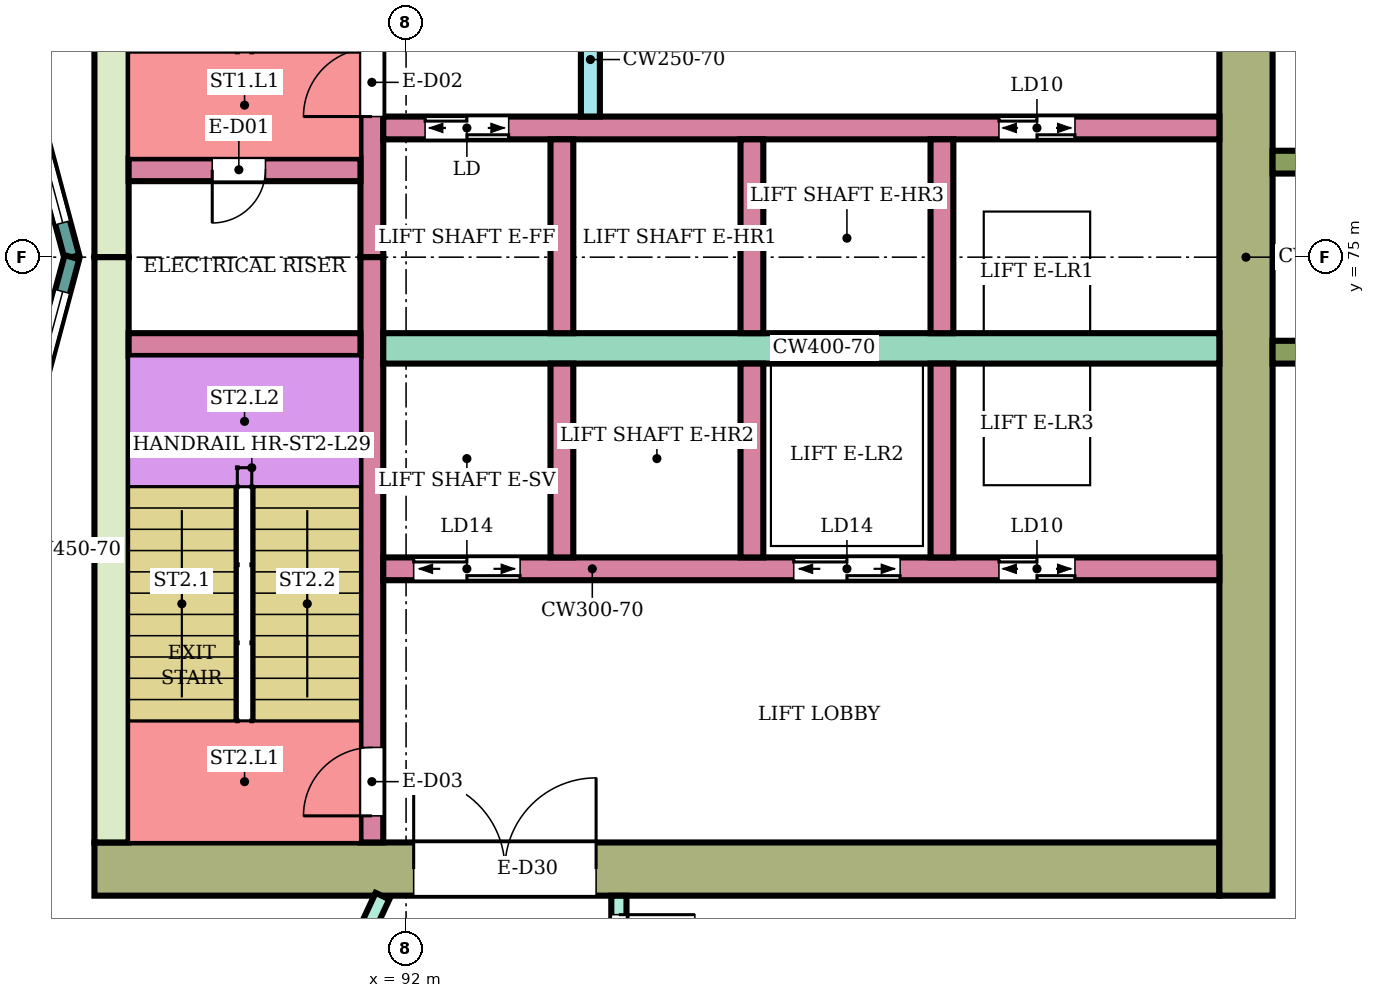
"""IFC4 building model, lengths in metres.
Left out: names, types, materials, properties, quantities, classifications, styles, units other than length and angle.
Written with IfcOpenShell. Run it as: python <this file> out.ifc"""

import sys

from ifc_helpers import new_model, si_unit, direction, frame, frame_2d, origin, place, context, subcontext, project, spatial, rectangle, extrude, element, fill, save


model = new_model("IFC4")
c1 = context("Model", 3, precision=1e-05, world=origin(), true_north=direction((0.0, 1.0)))
c2 = subcontext(c1, "Body", "Model", "MODEL_VIEW")
j1 = project(units=[si_unit("LENGTHUNIT", "METRE"), si_unit("PLANEANGLEUNIT", "RADIAN")], contexts=[c1])
p1 = place(None, origin())
s1 = spatial("IfcSite", under=j1, at=p1, CompositionType="ELEMENT")
p2 = place(p1, origin())
s2 = spatial("IfcBuilding", under=s1, at=p2, CompositionType="ELEMENT")
p3 = place(p2, frame((0.0, 0.0, 126.3)))
s3 = spatial("IfcBuildingStorey", under=s2, at=p3, CompositionType="ELEMENT", Elevation=126.3)
p4 = place(p3, frame((87.9, 66.95, 0.0), z_axis=(0.0, 0.0, 1.0), x_axis=(1.0, 0.0, 0.0)))
e1 = element("IfcWall", 1, at=p4, inside=s3, PredefinedType="SHEAR", context=c2, shape_type="SweptSolid", body=[
    extrude(rectangle(XDim=14.8, YDim=0.7, at=frame_2d((7.4, 0.0))), origin(), (0.0, 0.0, 1.0), 3.58),
])
p5 = place(p4, frame((4.2, 0.0, 0.0)))
e2 = element("IfcOpeningElement", 2, at=p5, cuts=e1, PredefinedType="OPENING", context=c2, shape_type="SweptSolid", body=[
    extrude(rectangle(XDim=2.4, YDim=2.4, at=frame_2d((1.2, 1.2))), frame((0.0, 0.36, 0.0), z_axis=(0.0, -1.0, 0.0), x_axis=(1.0, 0.0, 0.0)), (0.0, 0.0, 1.0), 0.72),
])
for number, where, z_axis, x_axis in (
    (3, (88.125, 75.0, 0.0), (0.0, 0.0, 1.0), (0.0, 1.0, 0.0)),
    (4, (88.125, 67.3, 0.0), (0.0, 0.0, 1.0), (0.0, 1.0, 0.0)),
):
    element("IfcWall", number, at=place(p3, frame(where, z_axis=z_axis, x_axis=x_axis)), inside=s3, PredefinedType="SHEAR", context=c2, shape_type="SweptSolid", body=[
        extrude(rectangle(XDim=7.7, YDim=0.45, at=frame_2d((3.85, 0.0))), origin(), (0.0, 0.0, 1.0), 3.58),
    ])
p6 = place(p3, frame((103.05, 66.6, 0.0), z_axis=(0.0, 0.0, 1.0), x_axis=(0.0, 1.0, 0.0)))
e5 = element("IfcWall", 5, at=p6, inside=s3, PredefinedType="SHEAR", context=c2, shape_type="SweptSolid", body=[
    extrude(rectangle(XDim=16.8, YDim=0.7, at=frame_2d((8.4, 0.0))), origin(), (0.0, 0.0, 1.0), 3.58),
])
p7 = place(p3, frame((91.55, 75.0, 0.0), z_axis=(0.0, 0.0, 1.0), x_axis=(0.0, 1.0, 0.0)))
e6 = element("IfcWall", 6, at=p7, inside=s3, PredefinedType="SHEAR", context=c2, shape_type="SweptSolid", body=[
    extrude(rectangle(XDim=7.7, YDim=0.3, at=frame_2d((3.85, 0.0))), origin(), (0.0, 0.0, 1.0), 3.58),
])
p8 = place(p7, frame((1.85, 0.0, 0.0)))
e7 = element("IfcOpeningElement", 7, at=p8, cuts=e6, PredefinedType="OPENING", context=c2, shape_type="SweptSolid", body=[
    extrude(rectangle(XDim=0.9, YDim=2.1, at=frame_2d((0.45, 1.05))), frame((0.0, 0.16, 0.0), z_axis=(0.0, -1.0, 0.0), x_axis=(1.0, 0.0, 0.0)), (0.0, 0.0, 1.0), 0.32),
])
p9 = place(p3, frame((91.55, 67.3, 0.0), z_axis=(0.0, 0.0, 1.0), x_axis=(0.0, 1.0, 0.0)))
e8 = element("IfcWall", 8, at=p9, inside=s3, PredefinedType="SHEAR", context=c2, shape_type="SweptSolid", body=[
    extrude(rectangle(XDim=7.7, YDim=0.3, at=frame_2d((3.85, 0.0))), origin(), (0.0, 0.0, 1.0), 3.58),
])
p10 = place(p9, frame((0.35, 0.0, 0.0)))
e9 = element("IfcOpeningElement", 9, at=p10, cuts=e8, PredefinedType="OPENING", context=c2, shape_type="SweptSolid", body=[
    extrude(rectangle(XDim=0.9, YDim=2.1, at=frame_2d((0.45, 1.05))), frame((0.0, 0.16, 0.0), z_axis=(0.0, -1.0, 0.0), x_axis=(1.0, 0.0, 0.0)), (0.0, 0.0, 1.0), 0.32),
])
p11 = place(p3, frame((88.35, 76.15, 0.0), z_axis=(0.0, 0.0, 1.0), x_axis=(1.0, 0.0, 0.0)))
e10 = element("IfcWall", 10, at=p11, inside=s3, PredefinedType="SHEAR", context=c2, shape_type="SweptSolid", body=[
    extrude(rectangle(XDim=3.05, YDim=0.3, at=frame_2d((1.525, 0.0))), origin(), (0.0, 0.0, 1.0), 3.58),
])
p12 = place(p11, frame((1.1, 0.0, 0.0)))
e11 = element("IfcOpeningElement", 11, at=p12, cuts=e10, PredefinedType="OPENING", context=c2, shape_type="SweptSolid", body=[
    extrude(rectangle(XDim=0.7, YDim=2.0, at=frame_2d((0.35, 1.0))), frame((0.0, 0.16, 0.0), z_axis=(0.0, -1.0, 0.0), x_axis=(1.0, 0.0, 0.0)), (0.0, 0.0, 1.0), 0.32),
])
p13 = place(p3, frame((88.35, 73.85, 0.0), z_axis=(0.0, 0.0, 1.0), x_axis=(1.0, 0.0, 0.0)))
e12 = element("IfcWall", 12, at=p13, inside=s3, PredefinedType="SHEAR", context=c2, shape_type="SweptSolid", body=[
    extrude(rectangle(XDim=3.05, YDim=0.3, at=frame_2d((1.525, 0.0))), origin(), (0.0, 0.0, 1.0), 3.58),
])
p14 = place(p3, frame((91.7, 76.7, 0.0), z_axis=(0.0, 0.0, 1.0), x_axis=(1.0, 0.0, 0.0)))
e13 = element("IfcWall", 13, at=p14, inside=s3, PredefinedType="SHEAR", context=c2, shape_type="SweptSolid", body=[
    extrude(rectangle(XDim=11.0, YDim=0.3, at=frame_2d((5.5, 0.0))), origin(), (0.0, 0.0, 1.0), 3.58),
])
p15 = place(p14, frame((0.55, 0.0, 0.0)))
e14 = element("IfcOpeningElement", 14, at=p15, cuts=e13, PredefinedType="OPENING", context=c2, shape_type="SweptSolid", body=[
    extrude(rectangle(XDim=1.1, YDim=2.1, at=frame_2d((0.55, 1.05))), frame((0.0, 0.16, 0.0), z_axis=(0.0, -1.0, 0.0), x_axis=(1.0, 0.0, 0.0)), (0.0, 0.0, 1.0), 0.32),
])
p16 = place(p14, frame((8.1, 0.0, 0.0)))
e15 = element("IfcOpeningElement", 15, at=p16, cuts=e13, PredefinedType="OPENING", context=c2, shape_type="SweptSolid", body=[
    extrude(rectangle(XDim=1.0, YDim=2.1, at=frame_2d((0.5, 1.05))), frame((0.0, 0.16, 0.0), z_axis=(0.0, -1.0, 0.0), x_axis=(1.0, 0.0, 0.0)), (0.0, 0.0, 1.0), 0.32),
])
p17 = place(p3, frame((91.7, 73.8, 0.0), z_axis=(0.0, 0.0, 1.0), x_axis=(1.0, 0.0, 0.0)))
e16 = element("IfcWall", 16, at=p17, inside=s3, PredefinedType="SHEAR", context=c2, shape_type="SweptSolid", body=[
    extrude(rectangle(XDim=11.0, YDim=0.4, at=frame_2d((5.5, 0.0))), origin(), (0.0, 0.0, 1.0), 3.58),
])
p18 = place(p3, frame((91.7, 70.9, 0.0), z_axis=(0.0, 0.0, 1.0), x_axis=(1.0, 0.0, 0.0)))
e17 = element("IfcWall", 17, at=p18, inside=s3, PredefinedType="SHEAR", context=c2, shape_type="SweptSolid", body=[
    extrude(rectangle(XDim=11.0, YDim=0.3, at=frame_2d((5.5, 0.0))), origin(), (0.0, 0.0, 1.0), 3.58),
])
p19 = place(p18, frame((0.4, 0.0, 0.0)))
e18 = element("IfcOpeningElement", 18, at=p19, cuts=e17, PredefinedType="OPENING", context=c2, shape_type="SweptSolid", body=[
    extrude(rectangle(XDim=1.4, YDim=2.1, at=frame_2d((0.7, 1.05))), frame((0.0, 0.16, 0.0), z_axis=(0.0, -1.0, 0.0), x_axis=(1.0, 0.0, 0.0)), (0.0, 0.0, 1.0), 0.32),
])
p20 = place(p18, frame((5.4, 0.0, 0.0)))
e19 = element("IfcOpeningElement", 19, at=p20, cuts=e17, PredefinedType="OPENING", context=c2, shape_type="SweptSolid", body=[
    extrude(rectangle(XDim=1.4, YDim=2.1, at=frame_2d((0.7, 1.05))), frame((0.0, 0.16, 0.0), z_axis=(0.0, -1.0, 0.0), x_axis=(1.0, 0.0, 0.0)), (0.0, 0.0, 1.0), 0.32),
])
p21 = place(p18, frame((8.1, 0.0, 0.0)))
e20 = element("IfcOpeningElement", 20, at=p21, cuts=e17, PredefinedType="OPENING", context=c2, shape_type="SweptSolid", body=[
    extrude(rectangle(XDim=1.0, YDim=2.1, at=frame_2d((0.5, 1.05))), frame((0.0, 0.16, 0.0), z_axis=(0.0, -1.0, 0.0), x_axis=(1.0, 0.0, 0.0)), (0.0, 0.0, 1.0), 0.32),
])
for number, where, z_axis, x_axis in (
    (21, (94.05, 74.0, 0.0), (0.0, 0.0, 1.0), (0.0, 1.0, 0.0)),
    (22, (96.55, 74.0, 0.0), (0.0, 0.0, 1.0), (0.0, 1.0, 0.0)),
    (23, (99.05, 74.0, 0.0), (0.0, 0.0, 1.0), (0.0, 1.0, 0.0)),
    (24, (94.05, 71.05, 0.0), (0.0, 0.0, 1.0), (0.0, 1.0, 0.0)),
    (25, (96.55, 71.05, 0.0), (0.0, 0.0, 1.0), (0.0, 1.0, 0.0)),
    (26, (99.05, 71.05, 0.0), (0.0, 0.0, 1.0), (0.0, 1.0, 0.0)),
):
    element("IfcWall", number, at=place(p3, frame(where, z_axis=z_axis, x_axis=x_axis)), inside=s3, PredefinedType="SHEAR", context=c2, shape_type="SweptSolid", body=[
        extrude(rectangle(XDim=2.55, YDim=0.3, at=frame_2d((1.275, 0.0))), origin(), (0.0, 0.0, 1.0), 3.58),
    ])
p22 = place(p3, frame((94.425, 76.85, 0.0), z_axis=(0.0, 0.0, 1.0), x_axis=(0.0, 1.0, 0.0)))
e27 = element("IfcWall", 27, at=p22, inside=s3, PredefinedType="SHEAR", context=c2, shape_type="SweptSolid", body=[
    extrude(rectangle(XDim=1.5, YDim=0.25, at=frame_2d((0.75, 0.0))), origin(), (0.0, 0.0, 1.0), 3.58),
])
for number, where, z_axis, x_axis in (
    (28, (103.4, 73.75, 0.0), (0.0, 0.0, 1.0), (1.0, 0.0, 0.0)),
    (29, (103.4, 76.25, 0.0), (0.0, 0.0, 1.0), (1.0, 0.0, 0.0)),
):
    element("IfcWall", number, at=place(p3, frame(where, z_axis=z_axis, x_axis=x_axis)), inside=s3, PredefinedType="NOTDEFINED", context=c2, shape_type="SweptSolid", body=[
        extrude(rectangle(XDim=2.416, YDim=0.3, at=frame_2d((1.208, 0.0))), origin(), (0.0, 0.0, 1.0), 3.9),
    ])
p23 = place(p3, frame((87.604, 75.0, 0.0), z_axis=(0.0, 0.0, 1.0), x_axis=(-0.258789828301, 0.965933654434, 0.0)))
e30 = element("IfcWall", 30, at=p23, inside=s3, PredefinedType="NOTDEFINED", context=c2, shape_type="SweptSolid", body=[
    extrude(rectangle(XDim=3.936, YDim=0.2, at=frame_2d((1.968, 0.0))), origin(), (0.0, 0.0, 1.0), 3.9),
])
p24 = place(p23, frame((0.468, 0.0, 0.9)))
e31 = element("IfcOpeningElement", 31, at=p24, cuts=e30, PredefinedType="OPENING", context=c2, shape_type="SweptSolid", body=[
    extrude(rectangle(XDim=3.0, YDim=2.3, at=frame_2d((1.5, 1.15))), frame((0.0, 0.11, 0.0), z_axis=(0.0, -1.0, 0.0), x_axis=(1.0, 0.0, 0.0)), (0.0, 0.0, 1.0), 0.22),
])
p25 = place(p3, frame((86.585, 71.198, 0.0), z_axis=(0.0, 0.0, 1.0), x_axis=(0.258789828301, 0.965933654434, 0.0)))
e32 = element("IfcWall", 32, at=p25, inside=s3, PredefinedType="NOTDEFINED", context=c2, shape_type="SweptSolid", body=[
    extrude(rectangle(XDim=3.936, YDim=0.2, at=frame_2d((1.968, 0.0))), origin(), (0.0, 0.0, 1.0), 3.9),
])
p26 = place(p25, frame((0.468, 0.0, 0.9)))
e33 = element("IfcOpeningElement", 33, at=p26, cuts=e32, PredefinedType="OPENING", context=c2, shape_type="SweptSolid", body=[
    extrude(rectangle(XDim=3.0, YDim=2.3, at=frame_2d((1.5, 1.15))), frame((0.0, 0.11, 0.0), z_axis=(0.0, -1.0, 0.0), x_axis=(1.0, 0.0, 0.0)), (0.0, 0.0, 1.0), 0.22),
])
p27 = place(p3, frame((88.502, 59.774, 0.0), z_axis=(0.0, 0.0, 1.0), x_axis=(0.423423307095, 0.905931952747, 0.0)))
e34 = element("IfcWall", 34, at=p27, inside=s3, PredefinedType="PARTITIONING", context=c2, shape_type="SweptSolid", body=[
    extrude(rectangle(XDim=7.529, YDim=0.2, at=frame_2d((3.764, 0.0))), origin(), (0.0, 0.0, 1.0), 3.45),
])
p28 = place(p3, frame((94.8, 65.1, 0.0), z_axis=(0.0, 0.0, 1.0), x_axis=(0.0, 1.0, 0.0)))
e35 = element("IfcWall", 35, at=p28, inside=s3, PredefinedType="PARTITIONING", context=c2, shape_type="SweptSolid", body=[
    extrude(rectangle(XDim=1.499, YDim=0.2, at=frame_2d((0.75, 0.0))), origin(), (0.0, 0.0, 1.0), 3.45),
])
p29 = place(p28, frame((0.25, 0.0, 0.0)))
e36 = element("IfcOpeningElement", 36, at=p29, cuts=e35, PredefinedType="OPENING", context=c2, shape_type="SweptSolid", body=[
    extrude(rectangle(XDim=1.0, YDim=2.1, at=frame_2d((0.5, 1.05))), frame((0.0, 0.11, 0.0), z_axis=(0.0, -1.0, 0.0), x_axis=(1.0, 0.0, 0.0)), (0.0, 0.0, 1.0), 0.22),
])
p30 = place(p24, origin())
e37 = element("IfcWindow", 37, at=p30, inside=s3, PartitioningType="SINGLE_PANEL", PredefinedType="WINDOW", context=c2, shape_type="SweptSolid", body=[
    extrude(rectangle(XDim=3.0, YDim=2.3, at=frame_2d((1.5, 1.15))), frame((0.0, 0.03, 0.0), z_axis=(0.0, -1.0, 0.0), x_axis=(1.0, 0.0, 0.0)), (0.0, 0.0, 1.0), 0.06),
])
fill(e31, e37)
p31 = place(p26, origin())
e38 = element("IfcWindow", 38, at=p31, inside=s3, PartitioningType="SINGLE_PANEL", PredefinedType="WINDOW", context=c2, shape_type="SweptSolid", body=[
    extrude(rectangle(XDim=3.0, YDim=2.3, at=frame_2d((1.5, 1.15))), frame((0.0, 0.03, 0.0), z_axis=(0.0, -1.0, 0.0), x_axis=(1.0, 0.0, 0.0)), (0.0, 0.0, 1.0), 0.06),
])
fill(e33, e38)
p32 = place(p29, frame((1.0, 0.0, 0.0), z_axis=(0.0, 0.0, 1.0), x_axis=(-1.0, 0.0, 0.0)))
e39 = element("IfcDoor", 39, at=p32, inside=s3, OperationType="SINGLE_SWING_LEFT", PredefinedType="DOOR", context=c2, shape_type="SweptSolid", body=[
    extrude(rectangle(XDim=1.0, YDim=2.1, at=frame_2d((0.5, 1.05))), frame((0.0, 0.025, 0.0), z_axis=(0.0, -1.0, 0.0), x_axis=(1.0, 0.0, 0.0)), (0.0, 0.0, 1.0), 0.05),
])
fill(e36, e39)
p33 = place(p12, frame((0.7, 0.0, 0.0), z_axis=(0.0, 0.0, 1.0), x_axis=(-1.0, 0.0, 0.0)))
e40 = element("IfcDoor", 40, at=p33, inside=s3, OperationType="SINGLE_SWING_RIGHT", PredefinedType="DOOR", context=c2, shape_type="SweptSolid", body=[
    extrude(rectangle(XDim=0.7, YDim=2.0, at=frame_2d((0.35, 1.0))), frame((0.0, 0.025, 0.0), z_axis=(0.0, -1.0, 0.0), x_axis=(1.0, 0.0, 0.0)), (0.0, 0.0, 1.0), 0.05),
])
fill(e11, e40)
p34 = place(p8, origin())
e41 = element("IfcDoor", 41, at=p34, inside=s3, OperationType="SINGLE_SWING_LEFT", PredefinedType="DOOR", context=c2, shape_type="SweptSolid", body=[
    extrude(rectangle(XDim=0.9, YDim=2.1, at=frame_2d((0.45, 1.05))), frame((0.0, 0.025, 0.0), z_axis=(0.0, -1.0, 0.0), x_axis=(1.0, 0.0, 0.0)), (0.0, 0.0, 1.0), 0.05),
])
fill(e7, e41)
p35 = place(p10, origin())
e42 = element("IfcDoor", 42, at=p35, inside=s3, OperationType="SINGLE_SWING_LEFT", PredefinedType="DOOR", context=c2, shape_type="SweptSolid", body=[
    extrude(rectangle(XDim=0.9, YDim=2.1, at=frame_2d((0.45, 1.05))), frame((0.0, 0.025, 0.0), z_axis=(0.0, -1.0, 0.0), x_axis=(1.0, 0.0, 0.0)), (0.0, 0.0, 1.0), 0.05),
])
fill(e9, e42)
p36 = place(p15, origin())
e43 = element("IfcDoor", 43, at=p36, inside=s3, OperationType="DOUBLE_DOOR_SLIDING", PredefinedType="DOOR", context=c2, shape_type="SweptSolid", body=[
    extrude(rectangle(XDim=1.1, YDim=2.1, at=frame_2d((0.55, 1.05))), frame((0.0, 0.025, 0.0), z_axis=(0.0, -1.0, 0.0), x_axis=(1.0, 0.0, 0.0)), (0.0, 0.0, 1.0), 0.05),
])
fill(e14, e43)
p37 = place(p16, origin())
e44 = element("IfcDoor", 44, at=p37, inside=s3, OperationType="DOUBLE_DOOR_SLIDING", PredefinedType="DOOR", context=c2, shape_type="SweptSolid", body=[
    extrude(rectangle(XDim=1.0, YDim=2.1, at=frame_2d((0.5, 1.05))), frame((0.0, 0.025, 0.0), z_axis=(0.0, -1.0, 0.0), x_axis=(1.0, 0.0, 0.0)), (0.0, 0.0, 1.0), 0.05),
])
fill(e15, e44)
p38 = place(p19, origin())
e45 = element("IfcDoor", 45, at=p38, inside=s3, OperationType="DOUBLE_DOOR_SLIDING", PredefinedType="DOOR", context=c2, shape_type="SweptSolid", body=[
    extrude(rectangle(XDim=1.4, YDim=2.1, at=frame_2d((0.7, 1.05))), frame((0.0, 0.025, 0.0), z_axis=(0.0, -1.0, 0.0), x_axis=(1.0, 0.0, 0.0)), (0.0, 0.0, 1.0), 0.05),
])
fill(e18, e45)
p39 = place(p20, origin())
e46 = element("IfcDoor", 46, at=p39, inside=s3, OperationType="DOUBLE_DOOR_SLIDING", PredefinedType="DOOR", context=c2, shape_type="SweptSolid", body=[
    extrude(rectangle(XDim=1.4, YDim=2.1, at=frame_2d((0.7, 1.05))), frame((0.0, 0.025, 0.0), z_axis=(0.0, -1.0, 0.0), x_axis=(1.0, 0.0, 0.0)), (0.0, 0.0, 1.0), 0.05),
])
fill(e19, e46)
p40 = place(p21, origin())
e47 = element("IfcDoor", 47, at=p40, inside=s3, OperationType="DOUBLE_DOOR_SLIDING", PredefinedType="DOOR", context=c2, shape_type="SweptSolid", body=[
    extrude(rectangle(XDim=1.0, YDim=2.1, at=frame_2d((0.5, 1.05))), frame((0.0, 0.025, 0.0), z_axis=(0.0, -1.0, 0.0), x_axis=(1.0, 0.0, 0.0)), (0.0, 0.0, 1.0), 0.05),
])
fill(e20, e47)
p41 = place(p5, origin())
e48 = element("IfcDoor", 48, at=p41, inside=s3, OperationType="DOUBLE_DOOR_SINGLE_SWING", PredefinedType="DOOR", context=c2, shape_type="SweptSolid", body=[
    extrude(rectangle(XDim=2.4, YDim=2.4, at=frame_2d((1.2, 1.2))), frame((0.0, 0.025, 0.0), z_axis=(0.0, -1.0, 0.0), x_axis=(1.0, 0.0, 0.0)), (0.0, 0.0, 1.0), 0.05),
])
fill(e2, e48)
save(model, sys.argv[1])
